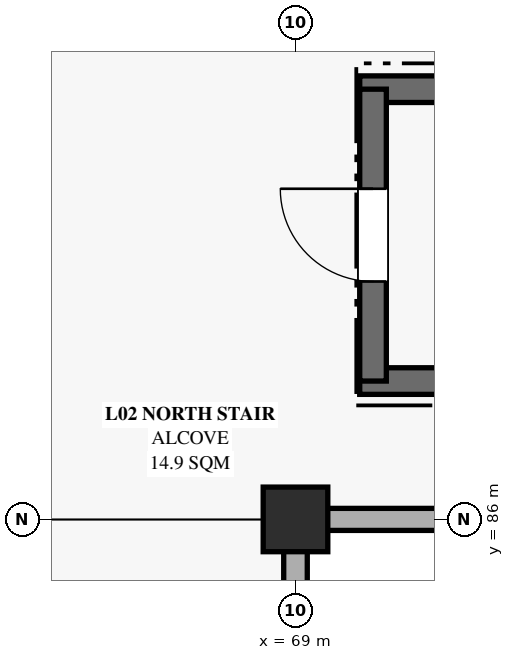
"""IFC4 building model, lengths in metres.
Left out: names, types, materials, properties, quantities, classifications, styles, units other than length and angle.
Written with IfcOpenShell. Run it as: python <this file> out.ifc"""

import sys

from ifc_helpers import new_model, si_unit, direction, frame, frame_2d, origin, origin_2d, place, context, subcontext, project, spatial, rectangle, extrude, element, fill, save


model = new_model("IFC4")
c1 = context("Model", 3, precision=1e-05, world=origin(), true_north=direction((0.0, 1.0)))
c2 = subcontext(c1, "Body", "Model", "MODEL_VIEW")
j1 = project(units=[si_unit("LENGTHUNIT", "METRE"), si_unit("PLANEANGLEUNIT", "RADIAN")], contexts=[c1])
p1 = place(None, origin())
s1 = spatial("IfcSite", under=j1, at=p1, CompositionType="ELEMENT")
p2 = place(p1, origin())
s2 = spatial("IfcBuilding", under=s1, at=p2, CompositionType="ELEMENT")
p3 = place(p2, frame((0.0, 0.0, 10.44)))
s3 = spatial("IfcBuildingStorey", under=s2, at=p3, CompositionType="ELEMENT", Elevation=10.44)
p4 = place(p3, frame((69.0, 86.0, 0.0), z_axis=(0.0, 0.0, 1.0), x_axis=(1.0, 0.0, 0.0)))
e1 = element("IfcColumn", 1, at=p4, inside=s3, PredefinedType="COLUMN", context=c2, shape_type="SweptSolid", body=[
    extrude(rectangle(XDim=0.85, YDim=0.85, at=origin_2d()), origin(), (0.0, 0.0, 1.0), 4.68),
])
p5 = place(p3, frame((69.0, 85.59, 0.0), z_axis=(0.0, 0.0, 1.0), x_axis=(0.0, -1.0, 0.0)))
e2 = element("IfcWall", 2, at=p5, inside=s3, PredefinedType="SOLIDWALL", context=c2, shape_type="SweptSolid", body=[
    extrude(rectangle(XDim=6.38, YDim=0.31, at=frame_2d((3.19, 0.0))), origin(), (0.0, 0.0, 1.0), 3.18),
])
p6 = place(p5, frame((2.34, 0.0, 0.85)))
e3 = element("IfcOpeningElement", 3, at=p6, cuts=e2, PredefinedType="OPENING", context=c2, shape_type="SweptSolid", body=[
    extrude(rectangle(XDim=1.7, YDim=2.0, at=frame_2d((0.85, 1.0))), frame((0.0, 0.165, 0.0), z_axis=(0.0, -1.0, 0.0), x_axis=(1.0, 0.0, 0.0)), (0.0, 0.0, 1.0), 0.33),
])
p7 = place(p3, frame((75.79, 86.0, 0.0), z_axis=(0.0, 0.0, 1.0), x_axis=(-1.0, 0.0, 0.0)))
e4 = element("IfcWall", 4, at=p7, inside=s3, PredefinedType="SOLIDWALL", context=c2, shape_type="SweptSolid", body=[
    extrude(rectangle(XDim=6.38, YDim=0.29, at=frame_2d((3.19, 0.0))), origin(), (0.0, 0.0, 1.0), 3.18),
])
p8 = place(p7, frame((2.54, 0.0, 0.85)))
e5 = element("IfcOpeningElement", 5, at=p8, cuts=e4, PredefinedType="OPENING", context=c2, shape_type="SweptSolid", body=[
    extrude(rectangle(XDim=1.3, YDim=1.9, at=frame_2d((0.65, 0.95))), frame((0.0, 0.155, 0.0), z_axis=(0.0, -1.0, 0.0), x_axis=(1.0, 0.0, 0.0)), (0.0, 0.0, 1.0), 0.31),
])
for number, where, z_axis, x_axis in (
    (6, (77.855, 87.82, 0.0), (0.0, 0.0, 1.0), (-1.0, 0.0, 0.0)),
    (7, (69.845, 91.66, 0.0), (0.0, 0.0, 1.0), (1.0, 0.0, 0.0)),
):
    element("IfcWall", number, at=place(p3, frame(where, z_axis=z_axis, x_axis=x_axis)), inside=s3, PredefinedType="SHEAR", context=c2, shape_type="SweptSolid", body=[
        extrude(rectangle(XDim=8.01, YDim=0.35, at=frame_2d((4.005, 0.0))), origin(), (0.0, 0.0, 1.0), 4.41),
    ])
p9 = place(p3, frame((70.02, 87.82, 0.0), z_axis=(0.0, 0.0, 1.0), x_axis=(0.0, 1.0, 0.0)))
e8 = element("IfcWall", 8, at=p9, inside=s3, PredefinedType="SHEAR", context=c2, shape_type="SweptSolid", body=[
    extrude(rectangle(XDim=3.84, YDim=0.35, at=frame_2d((1.92, 0.0))), origin(), (0.0, 0.0, 1.0), 4.41),
])
p10 = place(p9, frame((1.31, 0.0, 0.0)))
e9 = element("IfcOpeningElement", 9, at=p10, cuts=e8, PredefinedType="OPENING", context=c2, shape_type="SweptSolid", body=[
    extrude(rectangle(XDim=1.22, YDim=2.18, at=frame_2d((0.61, 1.09))), frame((0.0, 0.185, 0.0), z_axis=(0.0, -1.0, 0.0), x_axis=(1.0, 0.0, 0.0)), (0.0, 0.0, 1.0), 0.37),
])
p11 = place(p10, origin())
e10 = element("IfcDoor", 10, at=p11, inside=s3, OperationType="SINGLE_SWING_RIGHT", PredefinedType="DOOR", context=c2, shape_type="SweptSolid", body=[
    extrude(rectangle(XDim=1.22, YDim=2.18, at=frame_2d((0.61, 1.09))), frame((0.0, 0.025, 0.0), z_axis=(0.0, -1.0, 0.0), x_axis=(1.0, 0.0, 0.0)), (0.0, 0.0, 1.0), 0.05),
])
fill(e9, e10)
save(model, sys.argv[1])
